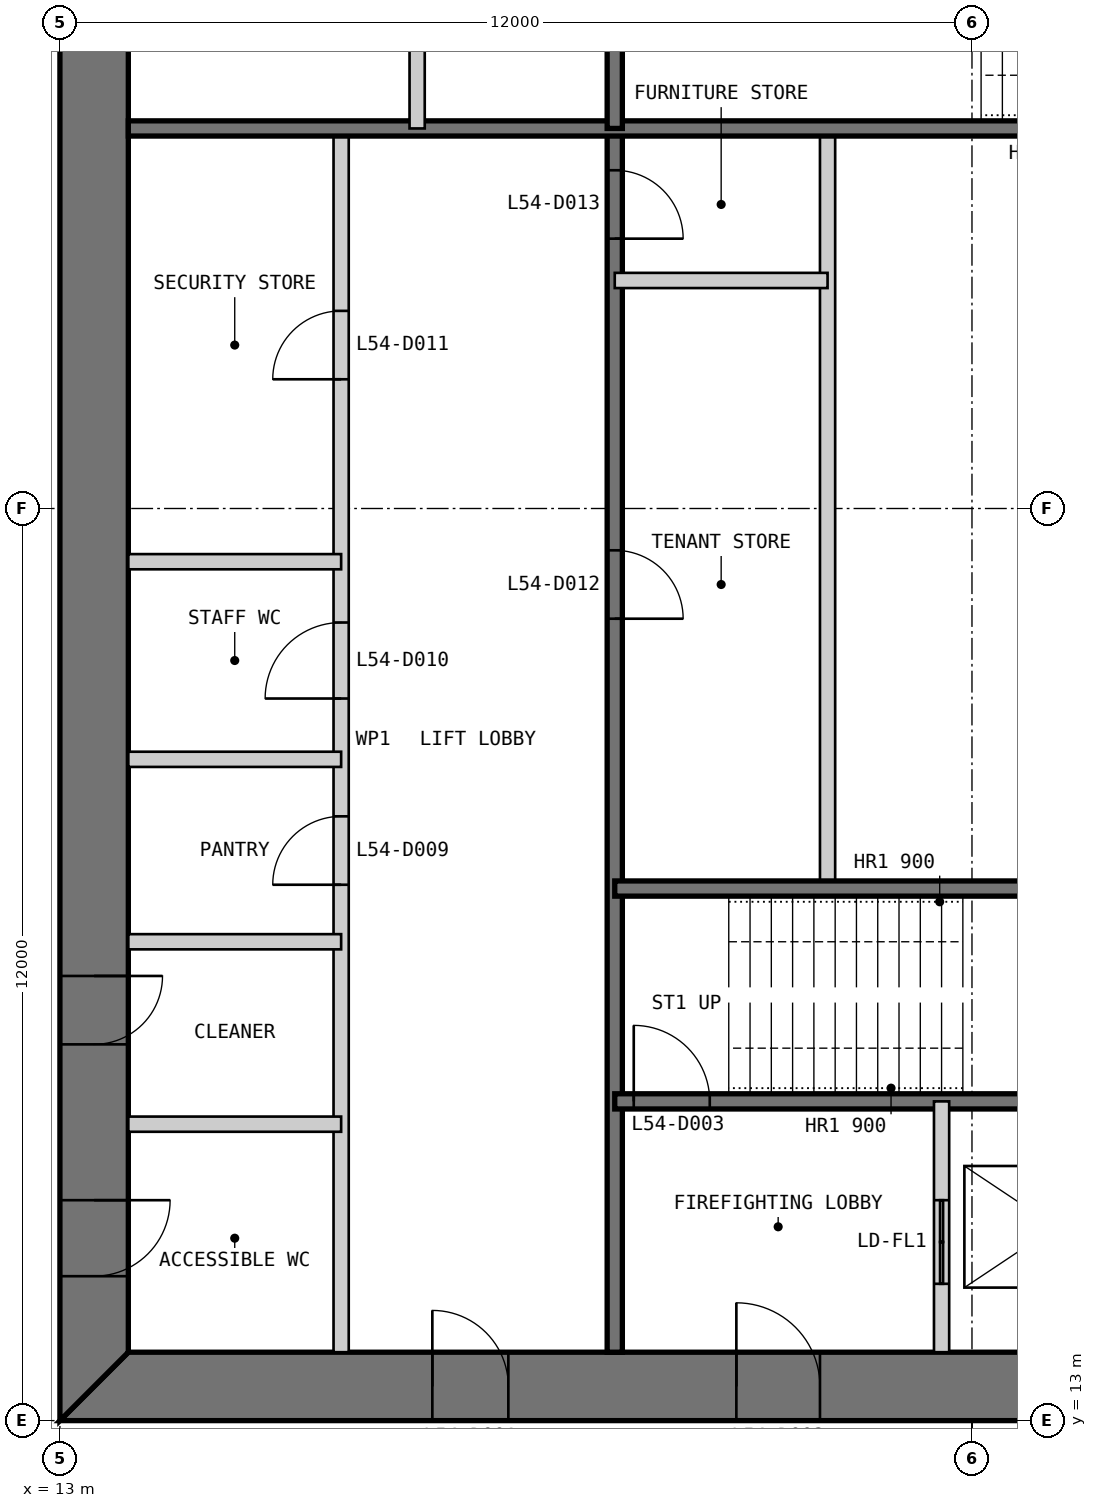
"""IFC4 building model, lengths in metres.
Left out: names, types, materials, properties, quantities, classifications, styles, units other than length and angle.
Written with IfcOpenShell. Run it as: python <this file> out.ifc"""

import sys

from ifc_helpers import new_model, si_unit, direction, frame, frame_2d, origin, place, context, subcontext, project, spatial, polyline, rectangle, outline, extrude, element, fill, save


model = new_model("IFC4")
c1 = context("Model", 3, precision=1e-05, world=origin(), true_north=direction((0.0, 1.0)))
c2 = subcontext(c1, "Body", "Model", "MODEL_VIEW")
j1 = project(units=[si_unit("LENGTHUNIT", "METRE"), si_unit("PLANEANGLEUNIT", "RADIAN")], contexts=[c1])
p1 = place(None, origin())
s1 = spatial("IfcSite", under=j1, at=p1, CompositionType="ELEMENT")
p2 = place(p1, origin())
s2 = spatial("IfcBuilding", under=s1, at=p2, CompositionType="ELEMENT")
p3 = place(p2, frame((0.0, 0.0, 229.8)))
s3 = spatial("IfcBuildingStorey", under=s2, at=p3, CompositionType="ELEMENT", Elevation=229.8)
p4 = place(p3, frame((13.0, 13.45, 0.0), z_axis=(0.0, 0.0, 1.0), x_axis=(1.0, 0.0, 0.0)))
e1 = element("IfcWall", 1, at=p4, inside=s3, PredefinedType="SHEAR", context=c2, shape_type="SweptSolid", body=[
    extrude(outline(polyline([(0.0, -0.45), (24.0, -0.45), (23.1, 0.45), (0.9, 0.45), (0.0, -0.45)])), origin(), (0.0, 0.0, 1.0), 4.0),
])
p5 = place(p4, frame((4.9, 0.0, 0.0)))
e2 = element("IfcOpeningElement", 2, at=p5, cuts=e1, PredefinedType="OPENING", context=c2, shape_type="SweptSolid", body=[
    extrude(rectangle(XDim=1.0, YDim=2.2, at=frame_2d((0.5, 1.1))), frame((0.0, 0.46, 0.0), z_axis=(0.0, -1.0, 0.0), x_axis=(1.0, 0.0, 0.0)), (0.0, 0.0, 1.0), 0.92),
])
p6 = place(p4, frame((8.9, 0.0, 0.0)))
e3 = element("IfcOpeningElement", 3, at=p6, cuts=e1, PredefinedType="OPENING", context=c2, shape_type="SweptSolid", body=[
    extrude(rectangle(XDim=1.1, YDim=2.2, at=frame_2d((0.55, 1.1))), frame((0.0, 0.46, 0.0), z_axis=(0.0, -1.0, 0.0), x_axis=(1.0, 0.0, 0.0)), (0.0, 0.0, 1.0), 0.92),
])
p7 = place(p4, frame((15.05, 0.0, 0.0)))
e4 = element("IfcOpeningElement", 4, at=p7, cuts=e1, PredefinedType="OPENING", context=c2, shape_type="SweptSolid", body=[
    extrude(rectangle(XDim=0.9, YDim=2.2, at=frame_2d((0.45, 1.1))), frame((0.0, 0.46, 0.0), z_axis=(0.0, -1.0, 0.0), x_axis=(1.0, 0.0, 0.0)), (0.0, 0.0, 1.0), 0.92),
])
p8 = place(p4, frame((17.9, 0.0, 0.0)))
e5 = element("IfcOpeningElement", 5, at=p8, cuts=e1, PredefinedType="OPENING", context=c2, shape_type="SweptSolid", body=[
    extrude(rectangle(XDim=1.0, YDim=2.2, at=frame_2d((0.5, 1.1))), frame((0.0, 0.46, 0.0), z_axis=(0.0, -1.0, 0.0), x_axis=(1.0, 0.0, 0.0)), (0.0, 0.0, 1.0), 0.92),
])
p9 = place(p4, frame((21.4, 0.0, 0.0)))
e6 = element("IfcOpeningElement", 6, at=p9, cuts=e1, PredefinedType="OPENING", context=c2, shape_type="SweptSolid", body=[
    extrude(rectangle(XDim=1.0, YDim=2.2, at=frame_2d((0.5, 1.1))), frame((0.0, 0.46, 0.0), z_axis=(0.0, -1.0, 0.0), x_axis=(1.0, 0.0, 0.0)), (0.0, 0.0, 1.0), 0.92),
])
p10 = place(p3, frame((13.45, 36.1, 0.0), z_axis=(0.0, 0.0, 1.0), x_axis=(0.0, -1.0, 0.0)))
e7 = element("IfcWall", 7, at=p10, inside=s3, PredefinedType="SHEAR", context=c2, shape_type="SweptSolid", body=[
    extrude(outline(polyline([(-0.9, -0.45), (23.1, -0.45), (22.2, 0.45), (0.0, 0.45), (-0.9, -0.45)])), origin(), (0.0, 0.0, 1.0), 4.0),
])
p11 = place(p10, frame((20.2, 0.0, 0.0)))
e8 = element("IfcOpeningElement", 8, at=p11, cuts=e7, PredefinedType="OPENING", context=c2, shape_type="SweptSolid", body=[
    extrude(rectangle(XDim=1.0, YDim=2.2, at=frame_2d((0.5, 1.1))), frame((0.0, 0.46, 0.0), z_axis=(0.0, -1.0, 0.0), x_axis=(1.0, 0.0, 0.0)), (0.0, 0.0, 1.0), 0.92),
])
p12 = place(p10, frame((17.25, 0.0, 0.0)))
e9 = element("IfcOpeningElement", 9, at=p12, cuts=e7, PredefinedType="OPENING", context=c2, shape_type="SweptSolid", body=[
    extrude(rectangle(XDim=0.9, YDim=2.2, at=frame_2d((0.45, 1.1))), frame((0.0, 0.46, 0.0), z_axis=(0.0, -1.0, 0.0), x_axis=(1.0, 0.0, 0.0)), (0.0, 0.0, 1.0), 0.92),
])
p13 = place(p3, frame((16.7, 13.9, 0.0), z_axis=(0.0, 0.0, 1.0), x_axis=(0.0, 1.0, 0.0)))
e10 = element("IfcWall", 10, at=p13, inside=s3, PredefinedType="PARTITIONING", context=c2, shape_type="SweptSolid", body=[
    extrude(rectangle(XDim=16.1, YDim=0.2, at=frame_2d((8.05, 0.0))), origin(), (0.0, 0.0, 1.0), 3.8),
])
p14 = place(p13, frame((6.15, 0.0, 0.0)))
e11 = element("IfcOpeningElement", 11, at=p14, cuts=e10, PredefinedType="OPENING", context=c2, shape_type="SweptSolid", body=[
    extrude(rectangle(XDim=0.9, YDim=2.2, at=frame_2d((0.45, 1.1))), frame((0.0, 0.11, 0.0), z_axis=(0.0, -1.0, 0.0), x_axis=(1.0, 0.0, 0.0)), (0.0, 0.0, 1.0), 0.22),
])
p15 = place(p13, frame((8.6, 0.0, 0.0)))
e12 = element("IfcOpeningElement", 12, at=p15, cuts=e10, PredefinedType="OPENING", context=c2, shape_type="SweptSolid", body=[
    extrude(rectangle(XDim=1.0, YDim=2.2, at=frame_2d((0.5, 1.1))), frame((0.0, 0.11, 0.0), z_axis=(0.0, -1.0, 0.0), x_axis=(1.0, 0.0, 0.0)), (0.0, 0.0, 1.0), 0.22),
])
p16 = place(p13, frame((12.8, 0.0, 0.0)))
e13 = element("IfcOpeningElement", 13, at=p16, cuts=e10, PredefinedType="OPENING", context=c2, shape_type="SweptSolid", body=[
    extrude(rectangle(XDim=0.9, YDim=2.2, at=frame_2d((0.45, 1.1))), frame((0.0, 0.11, 0.0), z_axis=(0.0, -1.0, 0.0), x_axis=(1.0, 0.0, 0.0)), (0.0, 0.0, 1.0), 0.22),
])
p17 = place(p3, frame((20.3, 13.9, 0.0), z_axis=(0.0, 0.0, 1.0), x_axis=(0.0, 1.0, 0.0)))
e14 = element("IfcWall", 14, at=p17, inside=s3, PredefinedType="SOLIDWALL", context=c2, shape_type="SweptSolid", body=[
    extrude(rectangle(XDim=16.1, YDim=0.2, at=frame_2d((8.05, 0.0))), origin(), (0.0, 0.0, 1.0), 3.8),
])
p18 = place(p17, frame((9.65, 0.0, 0.0)))
e15 = element("IfcOpeningElement", 15, at=p18, cuts=e14, PredefinedType="OPENING", context=c2, shape_type="SweptSolid", body=[
    extrude(rectangle(XDim=0.9, YDim=2.2, at=frame_2d((0.45, 1.1))), frame((0.0, 0.11, 0.0), z_axis=(0.0, -1.0, 0.0), x_axis=(1.0, 0.0, 0.0)), (0.0, 0.0, 1.0), 0.22),
])
p19 = place(p17, frame((14.65, 0.0, 0.0)))
e16 = element("IfcOpeningElement", 16, at=p19, cuts=e14, PredefinedType="OPENING", context=c2, shape_type="SweptSolid", body=[
    extrude(rectangle(XDim=0.9, YDim=2.2, at=frame_2d((0.45, 1.1))), frame((0.0, 0.11, 0.0), z_axis=(0.0, -1.0, 0.0), x_axis=(1.0, 0.0, 0.0)), (0.0, 0.0, 1.0), 0.22),
])
p20 = place(p3, frame((23.1, 20.0, 0.0), z_axis=(0.0, 0.0, 1.0), x_axis=(0.0, 1.0, 0.0)))
e17 = element("IfcWall", 17, at=p20, inside=s3, PredefinedType="PARTITIONING", context=c2, shape_type="SweptSolid", body=[
    extrude(rectangle(XDim=10.0, YDim=0.2, at=frame_2d((5.0, 0.0))), origin(), (0.0, 0.0, 1.0), 3.8),
])
p21 = place(p3, frame((20.3, 17.2, 0.0), z_axis=(0.0, 0.0, 1.0), x_axis=(1.0, 0.0, 0.0)))
e18 = element("IfcWall", 18, at=p21, inside=s3, PredefinedType="SOLIDWALL", context=c2, shape_type="SweptSolid", body=[
    extrude(rectangle(XDim=9.4, YDim=0.2, at=frame_2d((4.7, 0.0))), origin(), (0.0, 0.0, 1.0), 3.8),
])
p22 = place(p21, frame((0.25, 0.0, 0.0)))
e19 = element("IfcOpeningElement", 19, at=p22, cuts=e18, PredefinedType="OPENING", context=c2, shape_type="SweptSolid", body=[
    extrude(rectangle(XDim=1.0, YDim=2.2, at=frame_2d((0.5, 1.1))), frame((0.0, 0.11, 0.0), z_axis=(0.0, -1.0, 0.0), x_axis=(1.0, 0.0, 0.0)), (0.0, 0.0, 1.0), 0.22),
])
p23 = place(p3, frame((20.3, 20.0, 0.0), z_axis=(0.0, 0.0, 1.0), x_axis=(1.0, 0.0, 0.0)))
e20 = element("IfcWall", 20, at=p23, inside=s3, PredefinedType="SOLIDWALL", context=c2, shape_type="SweptSolid", body=[
    extrude(rectangle(XDim=15.8, YDim=0.2, at=frame_2d((7.9, 0.0))), origin(), (0.0, 0.0, 1.0), 3.8),
])
p24 = place(p3, frame((24.6, 13.9, 0.0), z_axis=(0.0, 0.0, 1.0), x_axis=(0.0, 1.0, 0.0)))
e21 = element("IfcWall", 21, at=p24, inside=s3, PredefinedType="PARTITIONING", context=c2, shape_type="SweptSolid", body=[
    extrude(rectangle(XDim=3.3, YDim=0.2, at=frame_2d((1.65, 0.0))), origin(), (0.0, 0.0, 1.0), 3.8),
])
p25 = place(p24, frame((0.9, 0.0, 0.0)))
e22 = element("IfcOpeningElement", 22, at=p25, cuts=e21, PredefinedType="OPENING", context=c2, shape_type="SweptSolid", body=[
    extrude(rectangle(XDim=1.1, YDim=2.2, at=frame_2d((0.55, 1.1))), frame((0.0, 0.11, 0.0), z_axis=(0.0, -1.0, 0.0), x_axis=(1.0, 0.0, 0.0)), (0.0, 0.0, 1.0), 0.22),
])
for number, where, z_axis, x_axis in (
    (23, (13.9, 16.9, 0.0), (0.0, 0.0, 1.0), (1.0, 0.0, 0.0)),
    (24, (13.9, 19.3, 0.0), (0.0, 0.0, 1.0), (1.0, 0.0, 0.0)),
    (25, (13.9, 21.7, 0.0), (0.0, 0.0, 1.0), (1.0, 0.0, 0.0)),
    (26, (13.9, 24.3, 0.0), (0.0, 0.0, 1.0), (1.0, 0.0, 0.0)),
    (27, (20.3, 28.0, 0.0), (0.0, 0.0, 1.0), (1.0, 0.0, 0.0)),
):
    element("IfcWall", number, at=place(p3, frame(where, z_axis=z_axis, x_axis=x_axis)), inside=s3, PredefinedType="PARTITIONING", context=c2, shape_type="SweptSolid", body=[
        extrude(rectangle(XDim=2.8, YDim=0.2, at=frame_2d((1.4, 0.0))), origin(), (0.0, 0.0, 1.0), 3.8),
    ])
p26 = place(p3, frame((29.7, 30.0, 0.0), z_axis=(0.0, 0.0, 1.0), x_axis=(-1.0, 0.0, 0.0)))
e28 = element("IfcWall", 28, at=p26, inside=s3, PredefinedType="SOLIDWALL", context=c2, shape_type="SweptSolid", body=[
    extrude(rectangle(XDim=15.8, YDim=0.2, at=frame_2d((7.9, 0.0))), origin(), (0.0, 0.0, 1.0), 3.8),
])
p27 = place(p3, frame((20.3, 36.1, 0.0), z_axis=(0.0, 0.0, 1.0), x_axis=(0.0, -1.0, 0.0)))
e29 = element("IfcWall", 29, at=p27, inside=s3, PredefinedType="SOLIDWALL", context=c2, shape_type="SweptSolid", body=[
    extrude(rectangle(XDim=6.1, YDim=0.2, at=frame_2d((3.05, 0.0))), origin(), (0.0, 0.0, 1.0), 3.8),
])
p28 = place(p3, frame((17.7, 36.1, 0.0), z_axis=(0.0, 0.0, 1.0), x_axis=(0.0, -1.0, 0.0)))
e30 = element("IfcWall", 30, at=p28, inside=s3, PredefinedType="PARTITIONING", context=c2, shape_type="SweptSolid", body=[
    extrude(rectangle(XDim=6.1, YDim=0.2, at=frame_2d((3.05, 0.0))), origin(), (0.0, 0.0, 1.0), 3.8),
])
p29 = place(p5, origin())
e31 = element("IfcDoor", 31, at=p29, inside=s3, OperationType="SINGLE_SWING_LEFT", PredefinedType="DOOR", context=c2, shape_type="SweptSolid", body=[
    extrude(rectangle(XDim=1.0, YDim=2.2, at=frame_2d((0.5, 1.1))), frame((0.0, 0.025, 0.0), z_axis=(0.0, -1.0, 0.0), x_axis=(1.0, 0.0, 0.0)), (0.0, 0.0, 1.0), 0.05),
    extrude(outline(polyline([(0.0, 0.0), (0.04, 0.0), (0.04, 2.16), (0.96, 2.16), (0.96, 0.0), (1.0, 0.0), (1.0, 2.2), (0.0, 2.2), (0.0, 0.0)])), frame((0.0, 0.3, 0.0), z_axis=(0.0, -1.0, 0.0), x_axis=(1.0, 0.0, 0.0)), (0.0, 0.0, 1.0), 0.6),
])
fill(e2, e31)
p30 = place(p6, origin())
e32 = element("IfcDoor", 32, at=p30, inside=s3, OperationType="SINGLE_SWING_LEFT", PredefinedType="DOOR", context=c2, shape_type="SweptSolid", body=[
    extrude(rectangle(XDim=1.1, YDim=2.2, at=frame_2d((0.55, 1.1))), frame((0.0, 0.025, 0.0), z_axis=(0.0, -1.0, 0.0), x_axis=(1.0, 0.0, 0.0)), (0.0, 0.0, 1.0), 0.05),
    extrude(outline(polyline([(0.0, 0.0), (0.04, 0.0), (0.04, 2.16), (1.06, 2.16), (1.06, 0.0), (1.1, 0.0), (1.1, 2.2), (0.0, 2.2), (0.0, 0.0)])), frame((0.0, 0.3, 0.0), z_axis=(0.0, -1.0, 0.0), x_axis=(1.0, 0.0, 0.0)), (0.0, 0.0, 1.0), 0.6),
])
fill(e3, e32)
p31 = place(p22, origin())
e33 = element("IfcDoor", 33, at=p31, inside=s3, OperationType="SINGLE_SWING_LEFT", PredefinedType="DOOR", context=c2, shape_type="SweptSolid", body=[
    extrude(rectangle(XDim=1.0, YDim=2.2, at=frame_2d((0.5, 1.1))), frame((0.0, 0.025, 0.0), z_axis=(0.0, -1.0, 0.0), x_axis=(1.0, 0.0, 0.0)), (0.0, 0.0, 1.0), 0.05),
])
fill(e19, e33)
p32 = place(p11, origin())
e34 = element("IfcDoor", 34, at=p32, inside=s3, OperationType="SINGLE_SWING_LEFT", PredefinedType="DOOR", context=c2, shape_type="SweptSolid", body=[
    extrude(rectangle(XDim=1.0, YDim=2.2, at=frame_2d((0.5, 1.1))), frame((0.0, 0.025, 0.0), z_axis=(0.0, -1.0, 0.0), x_axis=(1.0, 0.0, 0.0)), (0.0, 0.0, 1.0), 0.05),
    extrude(outline(polyline([(0.0, 0.0), (0.04, 0.0), (0.04, 2.16), (0.96, 2.16), (0.96, 0.0), (1.0, 0.0), (1.0, 2.2), (0.0, 2.2), (0.0, 0.0)])), frame((0.0, 0.3, 0.0), z_axis=(0.0, -1.0, 0.0), x_axis=(1.0, 0.0, 0.0)), (0.0, 0.0, 1.0), 0.6),
])
fill(e8, e34)
p33 = place(p12, origin())
e35 = element("IfcDoor", 35, at=p33, inside=s3, OperationType="SINGLE_SWING_LEFT", PredefinedType="DOOR", context=c2, shape_type="SweptSolid", body=[
    extrude(rectangle(XDim=0.9, YDim=2.2, at=frame_2d((0.45, 1.1))), frame((0.0, 0.025, 0.0), z_axis=(0.0, -1.0, 0.0), x_axis=(1.0, 0.0, 0.0)), (0.0, 0.0, 1.0), 0.05),
    extrude(outline(polyline([(0.0, 0.0), (0.04, 0.0), (0.04, 2.16), (0.86, 2.16), (0.86, 0.0), (0.9, 0.0), (0.9, 2.2), (0.0, 2.2), (0.0, 0.0)])), frame((0.0, 0.3, 0.0), z_axis=(0.0, -1.0, 0.0), x_axis=(1.0, 0.0, 0.0)), (0.0, 0.0, 1.0), 0.6),
])
fill(e9, e35)
p34 = place(p14, origin())
e36 = element("IfcDoor", 36, at=p34, inside=s3, OperationType="SINGLE_SWING_LEFT", PredefinedType="DOOR", context=c2, shape_type="SweptSolid", body=[
    extrude(rectangle(XDim=0.9, YDim=2.2, at=frame_2d((0.45, 1.1))), frame((0.0, 0.025, 0.0), z_axis=(0.0, -1.0, 0.0), x_axis=(1.0, 0.0, 0.0)), (0.0, 0.0, 1.0), 0.05),
])
fill(e11, e36)
p35 = place(p15, origin())
e37 = element("IfcDoor", 37, at=p35, inside=s3, OperationType="SINGLE_SWING_LEFT", PredefinedType="DOOR", context=c2, shape_type="SweptSolid", body=[
    extrude(rectangle(XDim=1.0, YDim=2.2, at=frame_2d((0.5, 1.1))), frame((0.0, 0.025, 0.0), z_axis=(0.0, -1.0, 0.0), x_axis=(1.0, 0.0, 0.0)), (0.0, 0.0, 1.0), 0.05),
])
fill(e12, e37)
p36 = place(p16, origin())
e38 = element("IfcDoor", 38, at=p36, inside=s3, OperationType="SINGLE_SWING_LEFT", PredefinedType="DOOR", context=c2, shape_type="SweptSolid", body=[
    extrude(rectangle(XDim=0.9, YDim=2.2, at=frame_2d((0.45, 1.1))), frame((0.0, 0.025, 0.0), z_axis=(0.0, -1.0, 0.0), x_axis=(1.0, 0.0, 0.0)), (0.0, 0.0, 1.0), 0.05),
])
fill(e13, e38)
p37 = place(p18, frame((0.9, 0.0, 0.0), z_axis=(0.0, 0.0, 1.0), x_axis=(-1.0, 0.0, 0.0)))
e39 = element("IfcDoor", 39, at=p37, inside=s3, OperationType="SINGLE_SWING_RIGHT", PredefinedType="DOOR", context=c2, shape_type="SweptSolid", body=[
    extrude(rectangle(XDim=0.9, YDim=2.2, at=frame_2d((0.45, 1.1))), frame((0.0, 0.025, 0.0), z_axis=(0.0, -1.0, 0.0), x_axis=(1.0, 0.0, 0.0)), (0.0, 0.0, 1.0), 0.05),
])
fill(e15, e39)
p38 = place(p19, frame((0.9, 0.0, 0.0), z_axis=(0.0, 0.0, 1.0), x_axis=(-1.0, 0.0, 0.0)))
e40 = element("IfcDoor", 40, at=p38, inside=s3, OperationType="SINGLE_SWING_RIGHT", PredefinedType="DOOR", context=c2, shape_type="SweptSolid", body=[
    extrude(rectangle(XDim=0.9, YDim=2.2, at=frame_2d((0.45, 1.1))), frame((0.0, 0.025, 0.0), z_axis=(0.0, -1.0, 0.0), x_axis=(1.0, 0.0, 0.0)), (0.0, 0.0, 1.0), 0.05),
])
fill(e16, e40)
p39 = place(p25, origin())
e41 = element("IfcDoor", 41, at=p39, inside=s3, OperationType="DOUBLE_DOOR_SLIDING", PredefinedType="DOOR", context=c2, shape_type="SweptSolid", body=[
    extrude(rectangle(XDim=1.1, YDim=2.2, at=frame_2d((0.55, 1.1))), frame((0.0, 0.025, 0.0), z_axis=(0.0, -1.0, 0.0), x_axis=(1.0, 0.0, 0.0)), (0.0, 0.0, 1.0), 0.05),
])
fill(e22, e41)
save(model, sys.argv[1])
